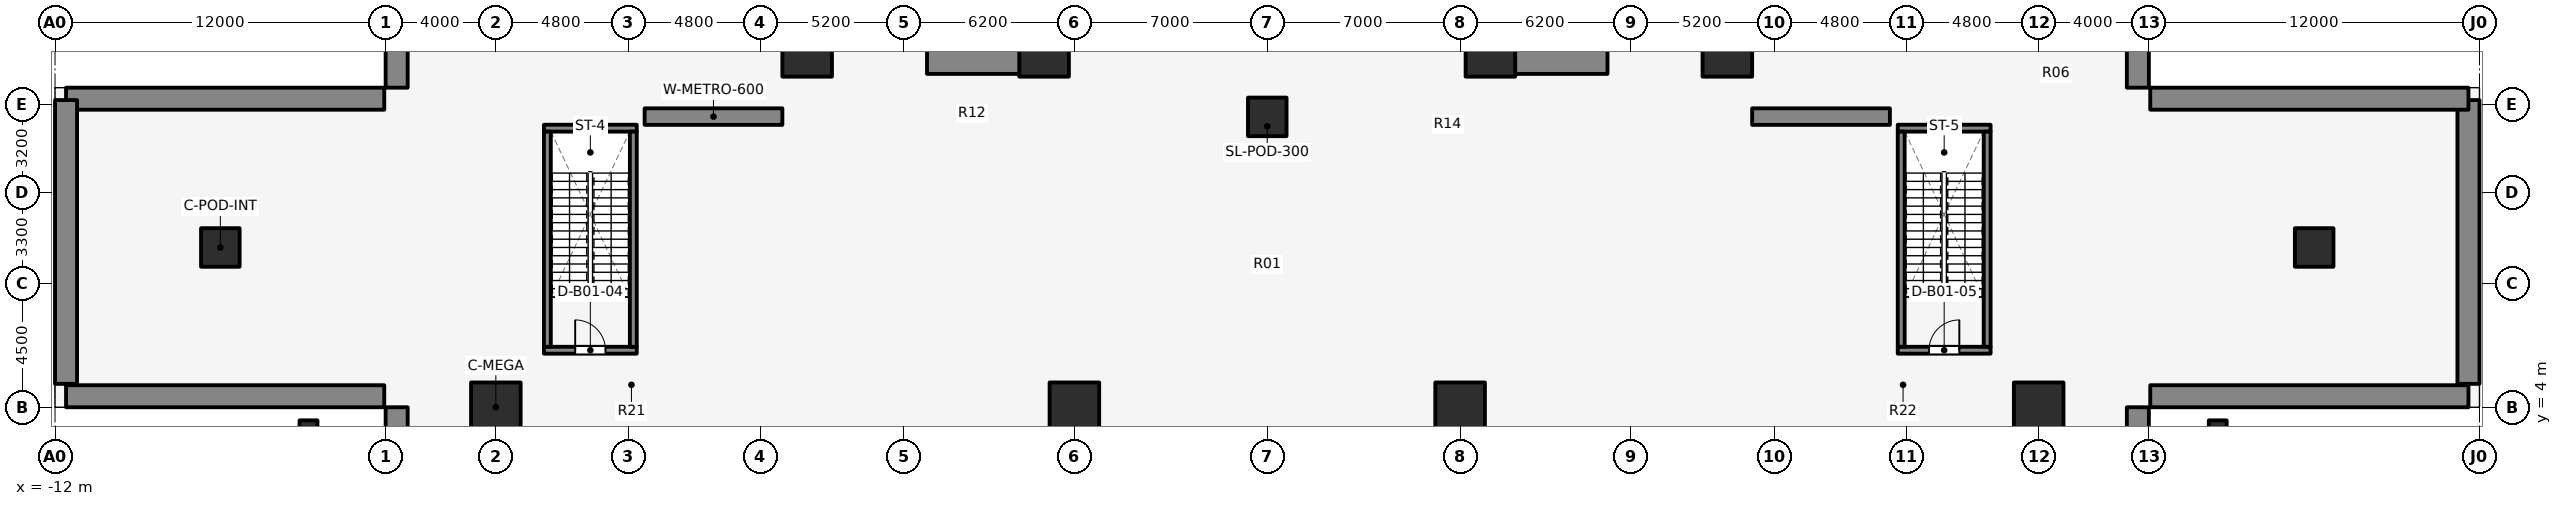
"""IFC4 building model, lengths in metres.
Left out: names, types, materials, properties, quantities, classifications, styles, units other than length and angle.
Written with IfcOpenShell. Run it as: python <this file> out.ifc"""

import sys

from ifc_helpers import new_model, si_unit, direction, frame, frame_2d, origin, origin_2d, place, context, subcontext, project, spatial, rectangle, extrude, element, fill, save


model = new_model("IFC4")
c1 = context("Model", 3, precision=1e-05, world=origin(), true_north=direction((0.0, 1.0)))
c2 = subcontext(c1, "Body", "Model", "MODEL_VIEW")
j1 = project(units=[si_unit("LENGTHUNIT", "METRE"), si_unit("PLANEANGLEUNIT", "RADIAN")], contexts=[c1])
p1 = place(None, origin())
s1 = spatial("IfcSite", under=j1, at=p1, CompositionType="ELEMENT")
p2 = place(p1, origin())
s2 = spatial("IfcBuilding", under=s1, at=p2, CompositionType="ELEMENT")
p3 = place(p2, frame((0.0, 0.0, -5.4)))
s3 = spatial("IfcBuildingStorey", under=s2, at=p3, CompositionType="ELEMENT", Elevation=-5.4)
for number, where, z_axis, x_axis in (
    (1, (-2.8, 3.2, 0.0), (0.0, 0.0, 1.0), (1.0, 0.0, 0.0)),
    (2, (66.5, 3.2, 0.0), (0.0, 0.0, 1.0), (1.0, 0.0, 0.0)),
):
    element("IfcColumn", number, at=place(p3, frame(where, z_axis=z_axis, x_axis=x_axis)), inside=s3, PredefinedType="PILASTER", context=c2, shape_type="SweptSolid", body=[
        extrude(rectangle(XDim=0.65, YDim=0.65, at=origin_2d()), origin(), (0.0, 0.0, 1.0), 5.16),
    ])
p4 = place(p3, frame((63.6, 0.85, 0.0), z_axis=(0.0, 0.0, 1.0), x_axis=(0.0, 1.0, 0.0)))
e3 = element("IfcWall", 3, at=p4, inside=s3, PredefinedType="USERDEFINED", context=c2, shape_type="SweptSolid", body=[
    extrude(rectangle(XDim=3.15, YDim=0.8, at=frame_2d((1.575, 0.0))), origin(), (0.0, 0.0, 1.0), 5.4),
])
p5 = place(p3, frame((64.05, 4.4, 0.0), z_axis=(0.0, 0.0, 1.0), x_axis=(1.0, 0.0, 0.0)))
e4 = element("IfcWall", 4, at=p5, inside=s3, PredefinedType="USERDEFINED", context=c2, shape_type="SweptSolid", body=[
    extrude(rectangle(XDim=11.55, YDim=0.8, at=frame_2d((5.775, 0.0))), origin(), (0.0, 0.0, 1.0), 5.4),
])
p6 = place(p3, frame((75.6, 4.85, 0.0), z_axis=(0.0, 0.0, 1.0), x_axis=(0.0, 1.0, 0.0)))
e5 = element("IfcWall", 5, at=p6, inside=s3, PredefinedType="USERDEFINED", context=c2, shape_type="SweptSolid", body=[
    extrude(rectangle(XDim=10.3, YDim=0.8, at=frame_2d((5.15, 0.0))), origin(), (0.0, 0.0, 1.0), 5.4),
])
p7 = place(p3, frame((75.6, 15.2, 0.0), z_axis=(0.0, 0.0, 1.0), x_axis=(-1.0, 0.0, 0.0)))
e6 = element("IfcWall", 6, at=p7, inside=s3, PredefinedType="USERDEFINED", context=c2, shape_type="SweptSolid", body=[
    extrude(rectangle(XDim=11.55, YDim=0.8, at=frame_2d((5.775, 0.0))), origin(), (0.0, 0.0, 1.0), 5.4),
])
for number, where, z_axis, x_axis in (
    (7, (63.6, 15.6, 0.0), (0.0, 0.0, 1.0), (0.0, 1.0, 0.0)),
    (8, (0.4, 45.15, 0.0), (0.0, 0.0, 1.0), (0.0, -1.0, 0.0)),
):
    element("IfcWall", number, at=place(p3, frame(where, z_axis=z_axis, x_axis=x_axis)), inside=s3, PredefinedType="USERDEFINED", context=c2, shape_type="SweptSolid", body=[
        extrude(rectangle(XDim=29.55, YDim=0.8, at=frame_2d((14.775, 0.0))), origin(), (0.0, 0.0, 1.0), 5.4),
    ])
p8 = place(p3, frame((-0.05, 15.2, 0.0), z_axis=(0.0, 0.0, 1.0), x_axis=(-1.0, 0.0, 0.0)))
e9 = element("IfcWall", 9, at=p8, inside=s3, PredefinedType="USERDEFINED", context=c2, shape_type="SweptSolid", body=[
    extrude(rectangle(XDim=11.55, YDim=0.8, at=frame_2d((5.775, 0.0))), origin(), (0.0, 0.0, 1.0), 5.4),
])
p9 = place(p3, frame((-11.6, 15.15, 0.0), z_axis=(0.0, 0.0, 1.0), x_axis=(0.0, -1.0, 0.0)))
e10 = element("IfcWall", 10, at=p9, inside=s3, PredefinedType="USERDEFINED", context=c2, shape_type="SweptSolid", body=[
    extrude(rectangle(XDim=10.3, YDim=0.8, at=frame_2d((5.15, 0.0))), origin(), (0.0, 0.0, 1.0), 5.4),
])
p10 = place(p3, frame((-11.6, 4.4, 0.0), z_axis=(0.0, 0.0, 1.0), x_axis=(1.0, 0.0, 0.0)))
e11 = element("IfcWall", 11, at=p10, inside=s3, PredefinedType="USERDEFINED", context=c2, shape_type="SweptSolid", body=[
    extrude(rectangle(XDim=11.55, YDim=0.8, at=frame_2d((5.775, 0.0))), origin(), (0.0, 0.0, 1.0), 5.4),
])
p11 = place(p3, frame((0.4, 4.0, 0.0), z_axis=(0.0, 0.0, 1.0), x_axis=(0.0, -1.0, 0.0)))
e12 = element("IfcWall", 12, at=p11, inside=s3, PredefinedType="USERDEFINED", context=c2, shape_type="SweptSolid", body=[
    extrude(rectangle(XDim=3.15, YDim=0.8, at=frame_2d((1.575, 0.0))), origin(), (0.0, 0.0, 1.0), 5.4),
])
for number, where, z_axis, x_axis in (
    (13, (9.4, 14.55, 0.0), (0.0, 0.0, 1.0), (1.0, 0.0, 0.0)),
    (14, (49.6, 14.55, 0.0), (0.0, 0.0, 1.0), (1.0, 0.0, 0.0)),
):
    element("IfcWall", number, at=place(p3, frame(where, z_axis=z_axis, x_axis=x_axis)), inside=s3, PredefinedType="SOLIDWALL", context=c2, shape_type="SweptSolid", body=[
        extrude(rectangle(XDim=5.0, YDim=0.6, at=frame_2d((2.5, 0.0))), origin(), (0.0, 0.0, 1.0), 5.4),
    ])
for number, where, z_axis, x_axis in (
    (15, (19.65, 16.55, 0.0), (0.0, 0.0, 1.0), (1.0, 0.0, 0.0)),
    (16, (39.85, 16.55, 0.0), (0.0, 0.0, 1.0), (1.0, 0.0, 0.0)),
):
    element("IfcWall", number, at=place(p3, frame(where, z_axis=z_axis, x_axis=x_axis)), inside=s3, PredefinedType="SHEAR", context=c2, shape_type="SweptSolid", body=[
        extrude(rectangle(XDim=4.5, YDim=0.9, at=frame_2d((2.25, 0.0))), origin(), (0.0, 0.0, 1.0), 5.4),
    ])
p12 = place(p3, frame((5.745, 6.07, 0.0), z_axis=(0.0, 0.0, 1.0), x_axis=(1.0, 0.0, 0.0)))
e17 = element("IfcWall", 17, at=p12, inside=s3, PredefinedType="SOLIDWALL", context=c2, shape_type="SweptSolid", body=[
    extrude(rectangle(XDim=3.37, YDim=0.25, at=frame_2d((1.685, 0.0))), origin(), (0.0, 0.0, 1.0), 5.4),
])
p13 = place(p12, frame((1.135, 0.0, 0.0)))
e18 = element("IfcOpeningElement", 18, at=p13, cuts=e17, PredefinedType="OPENING", context=c2, shape_type="SweptSolid", body=[
    extrude(rectangle(XDim=1.1, YDim=2.1, at=frame_2d((0.55, 1.05))), frame((0.0, 0.135, 0.0), z_axis=(0.0, -1.0, 0.0), x_axis=(1.0, 0.0, 0.0)), (0.0, 0.0, 1.0), 0.27),
])
p14 = place(p3, frame((5.745, 14.13, 0.0), z_axis=(0.0, 0.0, 1.0), x_axis=(1.0, 0.0, 0.0)))
e19 = element("IfcWall", 19, at=p14, inside=s3, PredefinedType="SOLIDWALL", context=c2, shape_type="SweptSolid", body=[
    extrude(rectangle(XDim=3.37, YDim=0.25, at=frame_2d((1.685, 0.0))), origin(), (0.0, 0.0, 1.0), 5.4),
])
for number, where, z_axis, x_axis in (
    (20, (5.87, 6.195, 0.0), (0.0, 0.0, 1.0), (0.0, 1.0, 0.0)),
    (21, (8.99, 6.195, 0.0), (0.0, 0.0, 1.0), (0.0, 1.0, 0.0)),
):
    element("IfcWall", number, at=place(p3, frame(where, z_axis=z_axis, x_axis=x_axis)), inside=s3, PredefinedType="SOLIDWALL", context=c2, shape_type="SweptSolid", body=[
        extrude(rectangle(XDim=7.81, YDim=0.25, at=frame_2d((3.905, 0.0))), origin(), (0.0, 0.0, 1.0), 5.4),
    ])
p15 = place(p3, frame((54.885, 6.07, 0.0), z_axis=(0.0, 0.0, 1.0), x_axis=(1.0, 0.0, 0.0)))
e22 = element("IfcWall", 22, at=p15, inside=s3, PredefinedType="SOLIDWALL", context=c2, shape_type="SweptSolid", body=[
    extrude(rectangle(XDim=3.37, YDim=0.25, at=frame_2d((1.685, 0.0))), origin(), (0.0, 0.0, 1.0), 5.4),
])
p16 = place(p15, frame((1.135, 0.0, 0.0)))
e23 = element("IfcOpeningElement", 23, at=p16, cuts=e22, PredefinedType="OPENING", context=c2, shape_type="SweptSolid", body=[
    extrude(rectangle(XDim=1.1, YDim=2.1, at=frame_2d((0.55, 1.05))), frame((0.0, 0.135, 0.0), z_axis=(0.0, -1.0, 0.0), x_axis=(1.0, 0.0, 0.0)), (0.0, 0.0, 1.0), 0.27),
])
p17 = place(p3, frame((54.885, 14.13, 0.0), z_axis=(0.0, 0.0, 1.0), x_axis=(1.0, 0.0, 0.0)))
e24 = element("IfcWall", 24, at=p17, inside=s3, PredefinedType="SOLIDWALL", context=c2, shape_type="SweptSolid", body=[
    extrude(rectangle(XDim=3.37, YDim=0.25, at=frame_2d((1.685, 0.0))), origin(), (0.0, 0.0, 1.0), 5.4),
])
for number, where, z_axis, x_axis in (
    (25, (55.01, 6.195, 0.0), (0.0, 0.0, 1.0), (0.0, 1.0, 0.0)),
    (26, (58.13, 6.195, 0.0), (0.0, 0.0, 1.0), (0.0, 1.0, 0.0)),
):
    element("IfcWall", number, at=place(p3, frame(where, z_axis=z_axis, x_axis=x_axis)), inside=s3, PredefinedType="SOLIDWALL", context=c2, shape_type="SweptSolid", body=[
        extrude(rectangle(XDim=7.81, YDim=0.25, at=frame_2d((3.905, 0.0))), origin(), (0.0, 0.0, 1.0), 5.4),
    ])
for number, where, z_axis, x_axis in (
    (27, (-6.0, 9.8, 0.0), (0.0, 0.0, 1.0), (1.0, 0.0, 0.0)),
    (28, (70.0, 9.8, 0.0), (0.0, 0.0, 1.0), (1.0, 0.0, 0.0)),
):
    element("IfcColumn", number, at=place(p3, frame(where, z_axis=z_axis, x_axis=x_axis)), inside=s3, PredefinedType="COLUMN", context=c2, shape_type="SweptSolid", body=[
        extrude(rectangle(XDim=1.4, YDim=1.4, at=origin_2d()), origin(), (0.0, 0.0, 1.0), 5.4),
    ])
for number, where, z_axis, x_axis in (
    (29, (15.3, 16.9, 0.0), (0.0, 0.0, 1.0), (1.0, 0.0, 0.0)),
    (30, (23.9, 16.9, 0.0), (0.0, 0.0, 1.0), (1.0, 0.0, 0.0)),
    (31, (40.1, 16.9, 0.0), (0.0, 0.0, 1.0), (1.0, 0.0, 0.0)),
    (32, (48.7, 16.9, 0.0), (0.0, 0.0, 1.0), (1.0, 0.0, 0.0)),
    (33, (4.0, 4.0, 0.0), (0.0, 0.0, 1.0), (1.0, 0.0, 0.0)),
    (34, (25.0, 4.0, 0.0), (0.0, 0.0, 1.0), (1.0, 0.0, 0.0)),
    (35, (39.0, 4.0, 0.0), (0.0, 0.0, 1.0), (1.0, 0.0, 0.0)),
    (36, (60.0, 4.0, 0.0), (0.0, 0.0, 1.0), (1.0, 0.0, 0.0)),
):
    element("IfcColumn", number, at=place(p3, frame(where, z_axis=z_axis, x_axis=x_axis)), inside=s3, PredefinedType="COLUMN", context=c2, shape_type="SweptSolid", body=[
        extrude(rectangle(XDim=1.8, YDim=1.8, at=origin_2d()), origin(), (0.0, 0.0, 1.0), 5.4),
    ])
p18 = place(p3, frame((32.0, 14.54, 0.0), z_axis=(0.0, 0.0, 1.0), x_axis=(1.0, 0.0, 0.0)))
e37 = element("IfcColumn", 37, at=p18, inside=s3, PredefinedType="COLUMN", context=c2, shape_type="SweptSolid", body=[
    extrude(rectangle(XDim=1.4, YDim=1.4, at=origin_2d()), origin(), (0.0, 0.0, 1.0), 5.4),
])
p19 = place(p13, origin())
e38 = element("IfcDoor", 38, at=p19, inside=s3, OperationType="SINGLE_SWING_LEFT", PredefinedType="DOOR", context=c2, shape_type="SweptSolid", body=[
    extrude(rectangle(XDim=1.1, YDim=2.1, at=frame_2d((0.55, 1.05))), frame((0.0, 0.025, 0.0), z_axis=(0.0, -1.0, 0.0), x_axis=(1.0, 0.0, 0.0)), (0.0, 0.0, 1.0), 0.05),
])
fill(e18, e38)
p20 = place(p16, origin())
e39 = element("IfcDoor", 39, at=p20, inside=s3, OperationType="SINGLE_SWING_RIGHT", PredefinedType="DOOR", context=c2, shape_type="SweptSolid", body=[
    extrude(rectangle(XDim=1.1, YDim=2.1, at=frame_2d((0.55, 1.05))), frame((0.0, 0.025, 0.0), z_axis=(0.0, -1.0, 0.0), x_axis=(1.0, 0.0, 0.0)), (0.0, 0.0, 1.0), 0.05),
])
fill(e23, e39)
save(model, sys.argv[1])
